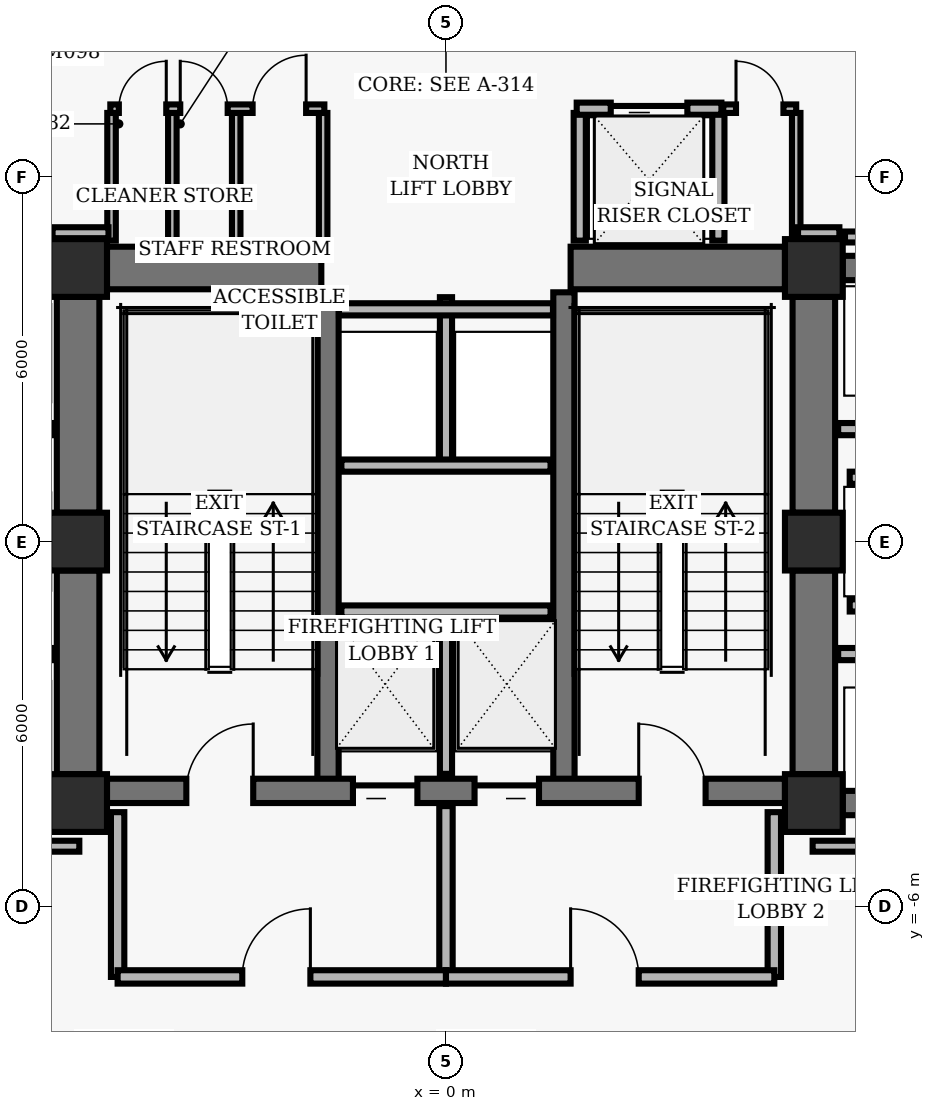
"""IFC4 building model, lengths in metres.
Left out: names, types, materials, properties, quantities, classifications, styles, units other than length and angle.
Written with IfcOpenShell. Run it as: python <this file> out.ifc"""

import sys

from ifc_helpers import new_model, si_unit, direction, frame, frame_2d, origin, origin_2d, place, context, subcontext, project, spatial, rectangle, hollow_rectangle, extrude, element, fill, save


model = new_model("IFC4")
c1 = context("Model", 3, precision=1e-05, world=origin(), true_north=direction((0.0, 1.0)))
c2 = subcontext(c1, "Body", "Model", "MODEL_VIEW")
j1 = project(units=[si_unit("LENGTHUNIT", "METRE"), si_unit("PLANEANGLEUNIT", "RADIAN")], contexts=[c1])
p1 = place(None, origin())
s1 = spatial("IfcSite", under=j1, at=p1, CompositionType="ELEMENT")
p2 = place(p1, origin())
s2 = spatial("IfcBuilding", under=s1, at=p2, CompositionType="ELEMENT")
p3 = place(p2, frame((0.0, 0.0, 28.96)))
s3 = spatial("IfcBuildingStorey", under=s2, at=p3, CompositionType="ELEMENT", Elevation=28.96)
for number, where, z_axis, x_axis in (
    (1, (-6.05, 4.5, 0.0), (0.0, 0.0, 1.0), (1.0, 0.0, 0.0)),
    (2, (6.05, 4.5, 0.0), (0.0, 0.0, 1.0), (1.0, 0.0, 0.0)),
    (3, (-6.05, 0.0, 0.0), (0.0, 0.0, 1.0), (1.0, 0.0, 0.0)),
    (4, (6.05, 0.0, 0.0), (0.0, 0.0, 1.0), (1.0, 0.0, 0.0)),
    (5, (-6.05, -4.3, 0.0), (0.0, 0.0, 1.0), (1.0, 0.0, 0.0)),
    (6, (6.05, -4.3, 0.0), (0.0, 0.0, 1.0), (1.0, 0.0, 0.0)),
):
    element("IfcColumn", number, at=place(p3, frame(where, z_axis=z_axis, x_axis=x_axis)), inside=s3, PredefinedType="COLUMN", context=c2, shape_type="SweptSolid", body=[
        extrude(hollow_rectangle(XDim=0.95, YDim=0.95, WallThickness=0.06, InnerFilletRadius=0.02, OuterFilletRadius=0.04, at=origin_2d()), origin(), (0.0, 0.0, 1.0), 3.36),
    ])
p4 = place(p3, frame((-6.05, 0.475, 0.0), z_axis=(0.0, 0.0, 1.0), x_axis=(0.0, 1.0, 0.0)))
e7 = element("IfcWall", 7, at=p4, inside=s3, PredefinedType="SHEAR", context=c2, shape_type="SweptSolid", body=[
    extrude(rectangle(XDim=3.55, YDim=0.7, at=frame_2d((1.775, 0.0))), origin(), (0.0, 0.0, 1.0), 3.098),
])
p5 = place(p3, frame((-6.05, -3.825, 0.0), z_axis=(0.0, 0.0, 1.0), x_axis=(0.0, 1.0, 0.0)))
e8 = element("IfcWall", 8, at=p5, inside=s3, PredefinedType="SHEAR", context=c2, shape_type="SweptSolid", body=[
    extrude(rectangle(XDim=3.35, YDim=0.7, at=frame_2d((1.675, 0.0))), origin(), (0.0, 0.0, 1.0), 3.098),
])
p6 = place(p3, frame((6.05, 0.475, 0.0), z_axis=(0.0, 0.0, 1.0), x_axis=(0.0, 1.0, 0.0)))
e9 = element("IfcWall", 9, at=p6, inside=s3, PredefinedType="SHEAR", context=c2, shape_type="SweptSolid", body=[
    extrude(rectangle(XDim=3.55, YDim=0.7, at=frame_2d((1.775, 0.0))), origin(), (0.0, 0.0, 1.0), 3.098),
])
p7 = place(p3, frame((6.05, -3.825, 0.0), z_axis=(0.0, 0.0, 1.0), x_axis=(0.0, 1.0, 0.0)))
e10 = element("IfcWall", 10, at=p7, inside=s3, PredefinedType="SHEAR", context=c2, shape_type="SweptSolid", body=[
    extrude(rectangle(XDim=3.35, YDim=0.7, at=frame_2d((1.675, 0.0))), origin(), (0.0, 0.0, 1.0), 3.098),
])
for number, where, z_axis, x_axis in (
    (11, (-1.94, -4.1, 0.0), (0.0, 0.0, 1.0), (0.0, 1.0, 0.0)),
    (12, (1.94, -4.1, 0.0), (0.0, 0.0, 1.0), (0.0, 1.0, 0.0)),
):
    element("IfcWall", number, at=place(p3, frame(where, z_axis=z_axis, x_axis=x_axis)), inside=s3, PredefinedType="SHEAR", context=c2, shape_type="SweptSolid", body=[
        extrude(rectangle(XDim=8.2, YDim=0.35, at=frame_2d((4.1, 0.0))), origin(), (0.0, 0.0, 1.0), 3.098),
    ])
p8 = place(p3, frame((-5.575, -4.1, 0.0), z_axis=(0.0, 0.0, 1.0), x_axis=(1.0, 0.0, 0.0)))
e13 = element("IfcWall", 13, at=p8, inside=s3, PredefinedType="SHEAR", context=c2, shape_type="SweptSolid", body=[
    extrude(rectangle(XDim=11.15, YDim=0.4, at=frame_2d((5.575, 0.0))), origin(), (0.0, 0.0, 1.0), 3.098),
])
p9 = place(p8, frame((1.305, 0.0, 0.0)))
e14 = element("IfcOpeningElement", 14, at=p9, cuts=e13, PredefinedType="OPENING", context=c2, shape_type="SweptSolid", body=[
    extrude(rectangle(XDim=1.1, YDim=2.04, at=frame_2d((0.55, 1.02))), frame((0.0, 0.21, 0.0), z_axis=(0.0, -1.0, 0.0), x_axis=(1.0, 0.0, 0.0)), (0.0, 0.0, 1.0), 0.42),
])
p10 = place(p8, frame((8.745, 0.0, 0.0)))
e15 = element("IfcOpeningElement", 15, at=p10, cuts=e13, PredefinedType="OPENING", context=c2, shape_type="SweptSolid", body=[
    extrude(rectangle(XDim=1.1, YDim=2.04, at=frame_2d((0.55, 1.02))), frame((0.0, 0.21, 0.0), z_axis=(0.0, -1.0, 0.0), x_axis=(1.0, 0.0, 0.0)), (0.0, 0.0, 1.0), 0.42),
])
p11 = place(p8, frame((4.045, 0.0, 0.0)))
e16 = element("IfcOpeningElement", 16, at=p11, cuts=e13, PredefinedType="OPENING", context=c2, shape_type="SweptSolid", body=[
    extrude(rectangle(XDim=1.06, YDim=2.04, at=frame_2d((0.53, 1.02))), frame((0.0, 0.21, 0.0), z_axis=(0.0, -1.0, 0.0), x_axis=(1.0, 0.0, 0.0)), (0.0, 0.0, 1.0), 0.42),
])
p12 = place(p8, frame((6.045, 0.0, 0.0)))
e17 = element("IfcOpeningElement", 17, at=p12, cuts=e13, PredefinedType="OPENING", context=c2, shape_type="SweptSolid", body=[
    extrude(rectangle(XDim=1.06, YDim=2.04, at=frame_2d((0.53, 1.02))), frame((0.0, 0.21, 0.0), z_axis=(0.0, -1.0, 0.0), x_axis=(1.0, 0.0, 0.0)), (0.0, 0.0, 1.0), 0.42),
])
for number, where, z_axis, x_axis in (
    (18, (-5.575, 4.5, 0.0), (0.0, 0.0, 1.0), (1.0, 0.0, 0.0)),
    (19, (2.05, 4.5, 0.0), (0.0, 0.0, 1.0), (1.0, 0.0, 0.0)),
):
    element("IfcWall", number, at=place(p3, frame(where, z_axis=z_axis, x_axis=x_axis)), inside=s3, PredefinedType="SHEAR", context=c2, shape_type="SweptSolid", body=[
        extrude(rectangle(XDim=3.525, YDim=0.7, at=frame_2d((1.762, 0.0))), origin(), (0.0, 0.0, 1.0), 3.098),
    ])
for number, where, z_axis, x_axis in (
    (20, (6.525, 4.5, 0.0), (0.0, 0.0, 1.0), (1.0, 0.0, 0.0)),
    (21, (6.525, -4.3, 0.0), (0.0, 0.0, 1.0), (1.0, 0.0, 0.0)),
):
    element("IfcWall", number, at=place(p3, frame(where, z_axis=z_axis, x_axis=x_axis)), inside=s3, PredefinedType="SHEAR", context=c2, shape_type="SweptSolid", body=[
        extrude(rectangle(XDim=1.95, YDim=0.4, at=frame_2d((0.975, 0.0))), origin(), (0.0, 0.0, 1.0), 3.098),
    ])
p13 = place(p3, frame((0.0, -3.82, 0.0), z_axis=(0.0, 0.0, 1.0), x_axis=(0.0, 1.0, 0.0)))
e22 = element("IfcWall", 22, at=p13, inside=s3, PredefinedType="PARTITIONING", context=c2, shape_type="SweptSolid", body=[
    extrude(rectangle(XDim=2.67, YDim=0.2, at=frame_2d((1.335, 0.0))), origin(), (0.0, 0.0, 1.0), 3.073),
])
p14 = place(p3, frame((-1.72, -1.15, 0.0), z_axis=(0.0, 0.0, 1.0), x_axis=(1.0, 0.0, 0.0)))
e23 = element("IfcWall", 23, at=p14, inside=s3, PredefinedType="PARTITIONING", context=c2, shape_type="SweptSolid", body=[
    extrude(rectangle(XDim=3.44, YDim=0.2, at=frame_2d((1.72, 0.0))), origin(), (0.0, 0.0, 1.0), 3.073),
])
for number, where, z_axis, x_axis in (
    (24, (-5.4, -7.16, 0.0), (0.0, 0.0, 1.0), (0.0, 1.0, 0.0)),
    (25, (5.4, -7.16, 0.0), (0.0, 0.0, 1.0), (0.0, 1.0, 0.0)),
):
    element("IfcWall", number, at=place(p3, frame(where, z_axis=z_axis, x_axis=x_axis)), inside=s3, PredefinedType="PARTITIONING", context=c2, shape_type="SweptSolid", body=[
        extrude(rectangle(XDim=2.71, YDim=0.22, at=frame_2d((1.355, 0.0))), origin(), (0.0, 0.0, 1.0), 3.073),
    ])
p15 = place(p3, frame((0.0, -7.16, 0.0), z_axis=(0.0, 0.0, 1.0), x_axis=(0.0, 1.0, 0.0)))
e26 = element("IfcWall", 26, at=p15, inside=s3, PredefinedType="PARTITIONING", context=c2, shape_type="SweptSolid", body=[
    extrude(rectangle(XDim=2.81, YDim=0.22, at=frame_2d((1.405, 0.0))), origin(), (0.0, 0.0, 1.0), 3.073),
])
p16 = place(p3, frame((-5.4, -7.16, 0.0), z_axis=(0.0, 0.0, 1.0), x_axis=(1.0, 0.0, 0.0)))
e27 = element("IfcWall", 27, at=p16, inside=s3, PredefinedType="PARTITIONING", context=c2, shape_type="SweptSolid", body=[
    extrude(rectangle(XDim=5.4, YDim=0.22, at=frame_2d((2.7, 0.0))), origin(), (0.0, 0.0, 1.0), 3.073),
])
p17 = place(p16, frame((2.05, 0.0, 0.0)))
e28 = element("IfcOpeningElement", 28, at=p17, cuts=e27, PredefinedType="OPENING", context=c2, shape_type="SweptSolid", body=[
    extrude(rectangle(XDim=1.12, YDim=2.02, at=frame_2d((0.56, 1.01))), frame((0.0, 0.12, 0.0), z_axis=(0.0, -1.0, 0.0), x_axis=(1.0, 0.0, 0.0)), (0.0, 0.0, 1.0), 0.24),
])
p18 = place(p3, frame((0.0, -7.16, 0.0), z_axis=(0.0, 0.0, 1.0), x_axis=(1.0, 0.0, 0.0)))
e29 = element("IfcWall", 29, at=p18, inside=s3, PredefinedType="PARTITIONING", context=c2, shape_type="SweptSolid", body=[
    extrude(rectangle(XDim=5.4, YDim=0.22, at=frame_2d((2.7, 0.0))), origin(), (0.0, 0.0, 1.0), 3.073),
])
p19 = place(p18, frame((2.05, 0.0, 0.0)))
e30 = element("IfcOpeningElement", 30, at=p19, cuts=e29, PredefinedType="OPENING", context=c2, shape_type="SweptSolid", body=[
    extrude(rectangle(XDim=1.12, YDim=2.02, at=frame_2d((0.56, 1.01))), frame((0.0, 0.12, 0.0), z_axis=(0.0, -1.0, 0.0), x_axis=(1.0, 0.0, 0.0)), (0.0, 0.0, 1.0), 0.24),
])
p20 = place(p3, frame((0.0, 1.25, 0.0), z_axis=(0.0, 0.0, 1.0), x_axis=(0.0, 1.0, 0.0)))
e31 = element("IfcWall", 31, at=p20, inside=s3, PredefinedType="PARTITIONING", context=c2, shape_type="SweptSolid", body=[
    extrude(rectangle(XDim=2.77, YDim=0.2, at=frame_2d((1.385, 0.0))), origin(), (0.0, 0.0, 1.0), 3.073),
])
p21 = place(p3, frame((-1.72, 1.25, 0.0), z_axis=(0.0, 0.0, 1.0), x_axis=(1.0, 0.0, 0.0)))
e32 = element("IfcWall", 32, at=p21, inside=s3, PredefinedType="PARTITIONING", context=c2, shape_type="SweptSolid", body=[
    extrude(rectangle(XDim=3.44, YDim=0.2, at=frame_2d((1.72, 0.0))), origin(), (0.0, 0.0, 1.0), 3.073),
])
p22 = place(p3, frame((-1.76, 3.82, 0.0), z_axis=(0.0, 0.0, 1.0), x_axis=(1.0, 0.0, 0.0)))
e33 = element("IfcWall", 33, at=p22, inside=s3, PredefinedType="PARTITIONING", context=c2, shape_type="SweptSolid", body=[
    extrude(rectangle(XDim=3.52, YDim=0.2, at=frame_2d((1.76, 0.0))), origin(), (0.0, 0.0, 1.0), 3.073),
])
for number, where, z_axis, x_axis in (
    (34, (2.2, 4.95, 0.0), (0.0, 0.0, 1.0), (0.0, 1.0, 0.0)),
    (35, (4.48, 4.95, 0.0), (0.0, 0.0, 1.0), (0.0, 1.0, 0.0)),
):
    element("IfcWall", number, at=place(p3, frame(where, z_axis=z_axis, x_axis=x_axis)), inside=s3, PredefinedType="PARTITIONING", context=c2, shape_type="SweptSolid", body=[
        extrude(rectangle(XDim=2.1, YDim=0.2, at=frame_2d((1.05, 0.0))), origin(), (0.0, 0.0, 1.0), 3.073),
    ])
p23 = place(p3, frame((2.15, 7.12, 0.0), z_axis=(0.0, 0.0, 1.0), x_axis=(1.0, 0.0, 0.0)))
e36 = element("IfcWall", 36, at=p23, inside=s3, PredefinedType="PARTITIONING", context=c2, shape_type="SweptSolid", body=[
    extrude(rectangle(XDim=2.38, YDim=0.2, at=frame_2d((1.19, 0.0))), origin(), (0.0, 0.0, 1.0), 3.073),
])
p24 = place(p23, frame((0.56, 0.0, 0.0)))
e37 = element("IfcOpeningElement", 37, at=p24, cuts=e36, PredefinedType="OPENING", context=c2, shape_type="SweptSolid", body=[
    extrude(rectangle(XDim=1.26, YDim=2.06, at=frame_2d((0.63, 1.03))), frame((0.0, 0.11, 0.0), z_axis=(0.0, -1.0, 0.0), x_axis=(1.0, 0.0, 0.0)), (0.0, 0.0, 1.0), 0.22),
])
for number, where, z_axis, x_axis in (
    (38, (-5.5, 4.95, 0.0), (0.0, 0.0, 1.0), (0.0, 1.0, 0.0)),
    (39, (-4.5, 4.95, 0.0), (0.0, 0.0, 1.0), (0.0, 1.0, 0.0)),
    (40, (-3.45, 4.95, 0.0), (0.0, 0.0, 1.0), (0.0, 1.0, 0.0)),
    (41, (-2.02, 4.95, 0.0), (0.0, 0.0, 1.0), (0.0, 1.0, 0.0)),
):
    element("IfcWall", number, at=place(p3, frame(where, z_axis=z_axis, x_axis=x_axis)), inside=s3, PredefinedType="PARTITIONING", context=c2, shape_type="SweptSolid", body=[
        extrude(rectangle(XDim=2.1, YDim=0.14, at=frame_2d((1.05, 0.0))), origin(), (0.0, 0.0, 1.0), 3.073),
    ])
p25 = place(p3, frame((-5.52, 7.12, 0.0), z_axis=(0.0, 0.0, 1.0), x_axis=(1.0, 0.0, 0.0)))
e42 = element("IfcWall", 42, at=p25, inside=s3, PredefinedType="PARTITIONING", context=c2, shape_type="SweptSolid", body=[
    extrude(rectangle(XDim=3.52, YDim=0.14, at=frame_2d((1.76, 0.0))), origin(), (0.0, 0.0, 1.0), 3.073),
])
p26 = place(p25, frame((0.14, 0.0, 0.0)))
e43 = element("IfcOpeningElement", 43, at=p26, cuts=e42, PredefinedType="OPENING", context=c2, shape_type="SweptSolid", body=[
    extrude(rectangle(XDim=0.78, YDim=2.01, at=frame_2d((0.39, 1.005))), frame((0.0, 0.08, 0.0), z_axis=(0.0, -1.0, 0.0), x_axis=(1.0, 0.0, 0.0)), (0.0, 0.0, 1.0), 0.16),
])
p27 = place(p25, frame((1.15, 0.0, 0.0)))
e44 = element("IfcOpeningElement", 44, at=p27, cuts=e42, PredefinedType="OPENING", context=c2, shape_type="SweptSolid", body=[
    extrude(rectangle(XDim=0.78, YDim=2.01, at=frame_2d((0.39, 1.005))), frame((0.0, 0.08, 0.0), z_axis=(0.0, -1.0, 0.0), x_axis=(1.0, 0.0, 0.0)), (0.0, 0.0, 1.0), 0.16),
])
p28 = place(p25, frame((2.34, 0.0, 0.0)))
e45 = element("IfcOpeningElement", 45, at=p28, cuts=e42, PredefinedType="OPENING", context=c2, shape_type="SweptSolid", body=[
    extrude(rectangle(XDim=0.88, YDim=2.02, at=frame_2d((0.44, 1.01))), frame((0.0, 0.08, 0.0), z_axis=(0.0, -1.0, 0.0), x_axis=(1.0, 0.0, 0.0)), (0.0, 0.0, 1.0), 0.16),
])
p29 = place(p3, frame((5.76, 4.95, 0.0), z_axis=(0.0, 0.0, 1.0), x_axis=(0.0, 1.0, 0.0)))
e46 = element("IfcWall", 46, at=p29, inside=s3, PredefinedType="PARTITIONING", context=c2, shape_type="SweptSolid", body=[
    extrude(rectangle(XDim=2.1, YDim=0.14, at=frame_2d((1.05, 0.0))), origin(), (0.0, 0.0, 1.0), 3.073),
])
p30 = place(p3, frame((4.56, 7.12, 0.0), z_axis=(0.0, 0.0, 1.0), x_axis=(1.0, 0.0, 0.0)))
e47 = element("IfcWall", 47, at=p30, inside=s3, PredefinedType="PARTITIONING", context=c2, shape_type="SweptSolid", body=[
    extrude(rectangle(XDim=1.2, YDim=0.14, at=frame_2d((0.6, 0.0))), origin(), (0.0, 0.0, 1.0), 3.073),
])
p31 = place(p30, frame((0.21, 0.0, 0.0)))
e48 = element("IfcOpeningElement", 48, at=p31, cuts=e47, PredefinedType="OPENING", context=c2, shape_type="SweptSolid", body=[
    extrude(rectangle(XDim=0.78, YDim=2.01, at=frame_2d((0.39, 1.005))), frame((0.0, 0.08, 0.0), z_axis=(0.0, -1.0, 0.0), x_axis=(1.0, 0.0, 0.0)), (0.0, 0.0, 1.0), 0.16),
])
for number, where, z_axis, x_axis in (
    (49, (-8.55, -1.85, 0.0), (0.0, 0.0, 1.0), (1.0, 0.0, 0.0)),
    (50, (-8.55, 1.85, 0.0), (0.0, 0.0, 1.0), (1.0, 0.0, 0.0)),
    (51, (6.45, -1.85, 0.0), (0.0, 0.0, 1.0), (1.0, 0.0, 0.0)),
    (52, (6.45, 1.85, 0.0), (0.0, 0.0, 1.0), (1.0, 0.0, 0.0)),
):
    element("IfcWall", number, at=place(p3, frame(where, z_axis=z_axis, x_axis=x_axis)), inside=s3, PredefinedType="PARTITIONING", context=c2, shape_type="SweptSolid", body=[
        extrude(rectangle(XDim=2.1, YDim=0.2, at=frame_2d((1.05, 0.0))), origin(), (0.0, 0.0, 1.0), 3.073),
    ])
for number, where, z_axis, x_axis in (
    (53, (6.64, -1.05, 0.0), (0.0, 0.0, 1.0), (1.0, 0.0, 0.0)),
    (54, (6.64, 1.05, 0.0), (0.0, 0.0, 1.0), (1.0, 0.0, 0.0)),
):
    element("IfcWall", number, at=place(p3, frame(where, z_axis=z_axis, x_axis=x_axis)), inside=s3, PredefinedType="PARTITIONING", context=c2, shape_type="SweptSolid", body=[
        extrude(rectangle(XDim=1.91, YDim=0.2, at=frame_2d((0.955, 0.0))), origin(), (0.0, 0.0, 1.0), 3.073),
    ])
for number, where, z_axis, x_axis in (
    (55, (-9.37, -5.01, 0.0), (0.0, 0.0, 1.0), (1.0, 0.0, 0.0)),
    (56, (6.03, -5.01, 0.0), (0.0, 0.0, 1.0), (1.0, 0.0, 0.0)),
):
    element("IfcWall", number, at=place(p3, frame(where, z_axis=z_axis, x_axis=x_axis)), inside=s3, PredefinedType="PARTITIONING", context=c2, shape_type="SweptSolid", body=[
        extrude(rectangle(XDim=3.34, YDim=0.18, at=frame_2d((1.67, 0.0))), origin(), (0.0, 0.0, 1.0), 3.073),
    ])
p32 = place(p3, frame((9.37, 5.01, 0.0), z_axis=(0.0, 0.0, 1.0), x_axis=(-1.0, 0.0, 0.0)))
e57 = element("IfcWall", 57, at=p32, inside=s3, PredefinedType="PARTITIONING", context=c2, shape_type="SweptSolid", body=[
    extrude(rectangle(XDim=2.808, YDim=0.18, at=frame_2d((1.404, 0.0))), origin(), (0.0, 0.0, 1.0), 3.073),
])
p33 = place(p3, frame((6.47, 5.08, 0.0), z_axis=(0.0, 0.0, 1.0), x_axis=(-1.0, 0.0, 0.0)))
e58 = element("IfcWall", 58, at=p33, inside=s3, PredefinedType="PARTITIONING", context=c2, shape_type="SweptSolid", body=[
    extrude(rectangle(XDim=0.68, YDim=0.18, at=frame_2d((0.34, 0.0))), origin(), (0.0, 0.0, 1.0), 3.073),
])
p34 = place(p3, frame((-5.55, 5.08, 0.0), z_axis=(0.0, 0.0, 1.0), x_axis=(-1.0, 0.0, 0.0)))
e59 = element("IfcWall", 59, at=p34, inside=s3, PredefinedType="PARTITIONING", context=c2, shape_type="SweptSolid", body=[
    extrude(rectangle(XDim=0.92, YDim=0.18, at=frame_2d((0.46, 0.0))), origin(), (0.0, 0.0, 1.0), 3.073),
])
p35 = place(p9, origin())
e60 = element("IfcDoor", 60, at=p35, inside=s3, OperationType="SINGLE_SWING_RIGHT", PredefinedType="DOOR", context=c2, shape_type="SweptSolid", body=[
    extrude(rectangle(XDim=1.1, YDim=2.04, at=frame_2d((0.55, 1.02))), frame((0.0, 0.025, 0.0), z_axis=(0.0, -1.0, 0.0), x_axis=(1.0, 0.0, 0.0)), (0.0, 0.0, 1.0), 0.05),
])
fill(e14, e60)
p36 = place(p10, origin())
e61 = element("IfcDoor", 61, at=p36, inside=s3, OperationType="SINGLE_SWING_LEFT", PredefinedType="DOOR", context=c2, shape_type="SweptSolid", body=[
    extrude(rectangle(XDim=1.1, YDim=2.04, at=frame_2d((0.55, 1.02))), frame((0.0, 0.025, 0.0), z_axis=(0.0, -1.0, 0.0), x_axis=(1.0, 0.0, 0.0)), (0.0, 0.0, 1.0), 0.05),
])
fill(e15, e61)
p37 = place(p11, origin())
e62 = element("IfcDoor", 62, at=p37, inside=s3, OperationType="SLIDING_TO_LEFT", PredefinedType="DOOR", context=c2, shape_type="SweptSolid", body=[
    extrude(rectangle(XDim=1.06, YDim=2.04, at=frame_2d((0.53, 1.02))), frame((0.0, 0.025, 0.0), z_axis=(0.0, -1.0, 0.0), x_axis=(1.0, 0.0, 0.0)), (0.0, 0.0, 1.0), 0.05),
])
fill(e16, e62)
p38 = place(p12, origin())
e63 = element("IfcDoor", 63, at=p38, inside=s3, OperationType="SLIDING_TO_RIGHT", PredefinedType="DOOR", context=c2, shape_type="SweptSolid", body=[
    extrude(rectangle(XDim=1.06, YDim=2.04, at=frame_2d((0.53, 1.02))), frame((0.0, 0.025, 0.0), z_axis=(0.0, -1.0, 0.0), x_axis=(1.0, 0.0, 0.0)), (0.0, 0.0, 1.0), 0.05),
])
fill(e17, e63)
p39 = place(p17, origin())
e64 = element("IfcDoor", 64, at=p39, inside=s3, OperationType="SINGLE_SWING_RIGHT", PredefinedType="DOOR", context=c2, shape_type="SweptSolid", body=[
    extrude(rectangle(XDim=1.12, YDim=2.02, at=frame_2d((0.56, 1.01))), frame((0.0, 0.025, 0.0), z_axis=(0.0, -1.0, 0.0), x_axis=(1.0, 0.0, 0.0)), (0.0, 0.0, 1.0), 0.05),
])
fill(e28, e64)
p40 = place(p19, origin())
e65 = element("IfcDoor", 65, at=p40, inside=s3, OperationType="SINGLE_SWING_LEFT", PredefinedType="DOOR", context=c2, shape_type="SweptSolid", body=[
    extrude(rectangle(XDim=1.12, YDim=2.02, at=frame_2d((0.56, 1.01))), frame((0.0, 0.025, 0.0), z_axis=(0.0, -1.0, 0.0), x_axis=(1.0, 0.0, 0.0)), (0.0, 0.0, 1.0), 0.05),
])
fill(e30, e65)
p41 = place(p24, origin())
e66 = element("IfcDoor", 66, at=p41, inside=s3, OperationType="SLIDING_TO_LEFT", PredefinedType="DOOR", context=c2, shape_type="SweptSolid", body=[
    extrude(rectangle(XDim=1.26, YDim=2.06, at=frame_2d((0.63, 1.03))), frame((0.0, 0.025, 0.0), z_axis=(0.0, -1.0, 0.0), x_axis=(1.0, 0.0, 0.0)), (0.0, 0.0, 1.0), 0.05),
])
fill(e37, e66)
p42 = place(p26, origin())
e67 = element("IfcDoor", 67, at=p42, inside=s3, OperationType="SINGLE_SWING_RIGHT", PredefinedType="DOOR", context=c2, shape_type="SweptSolid", body=[
    extrude(rectangle(XDim=0.78, YDim=2.01, at=frame_2d((0.39, 1.005))), frame((0.0, 0.025, 0.0), z_axis=(0.0, -1.0, 0.0), x_axis=(1.0, 0.0, 0.0)), (0.0, 0.0, 1.0), 0.05),
])
fill(e43, e67)
p43 = place(p27, origin())
e68 = element("IfcDoor", 68, at=p43, inside=s3, OperationType="SINGLE_SWING_LEFT", PredefinedType="DOOR", context=c2, shape_type="SweptSolid", body=[
    extrude(rectangle(XDim=0.78, YDim=2.01, at=frame_2d((0.39, 1.005))), frame((0.0, 0.025, 0.0), z_axis=(0.0, -1.0, 0.0), x_axis=(1.0, 0.0, 0.0)), (0.0, 0.0, 1.0), 0.05),
])
fill(e44, e68)
p44 = place(p28, origin())
e69 = element("IfcDoor", 69, at=p44, inside=s3, OperationType="SINGLE_SWING_RIGHT", PredefinedType="DOOR", context=c2, shape_type="SweptSolid", body=[
    extrude(rectangle(XDim=0.88, YDim=2.02, at=frame_2d((0.44, 1.01))), frame((0.0, 0.025, 0.0), z_axis=(0.0, -1.0, 0.0), x_axis=(1.0, 0.0, 0.0)), (0.0, 0.0, 1.0), 0.05),
])
fill(e45, e69)
p45 = place(p31, origin())
e70 = element("IfcDoor", 70, at=p45, inside=s3, OperationType="SINGLE_SWING_LEFT", PredefinedType="DOOR", context=c2, shape_type="SweptSolid", body=[
    extrude(rectangle(XDim=0.78, YDim=2.01, at=frame_2d((0.39, 1.005))), frame((0.0, 0.025, 0.0), z_axis=(0.0, -1.0, 0.0), x_axis=(1.0, 0.0, 0.0)), (0.0, 0.0, 1.0), 0.05),
])
fill(e48, e70)
save(model, sys.argv[1])
